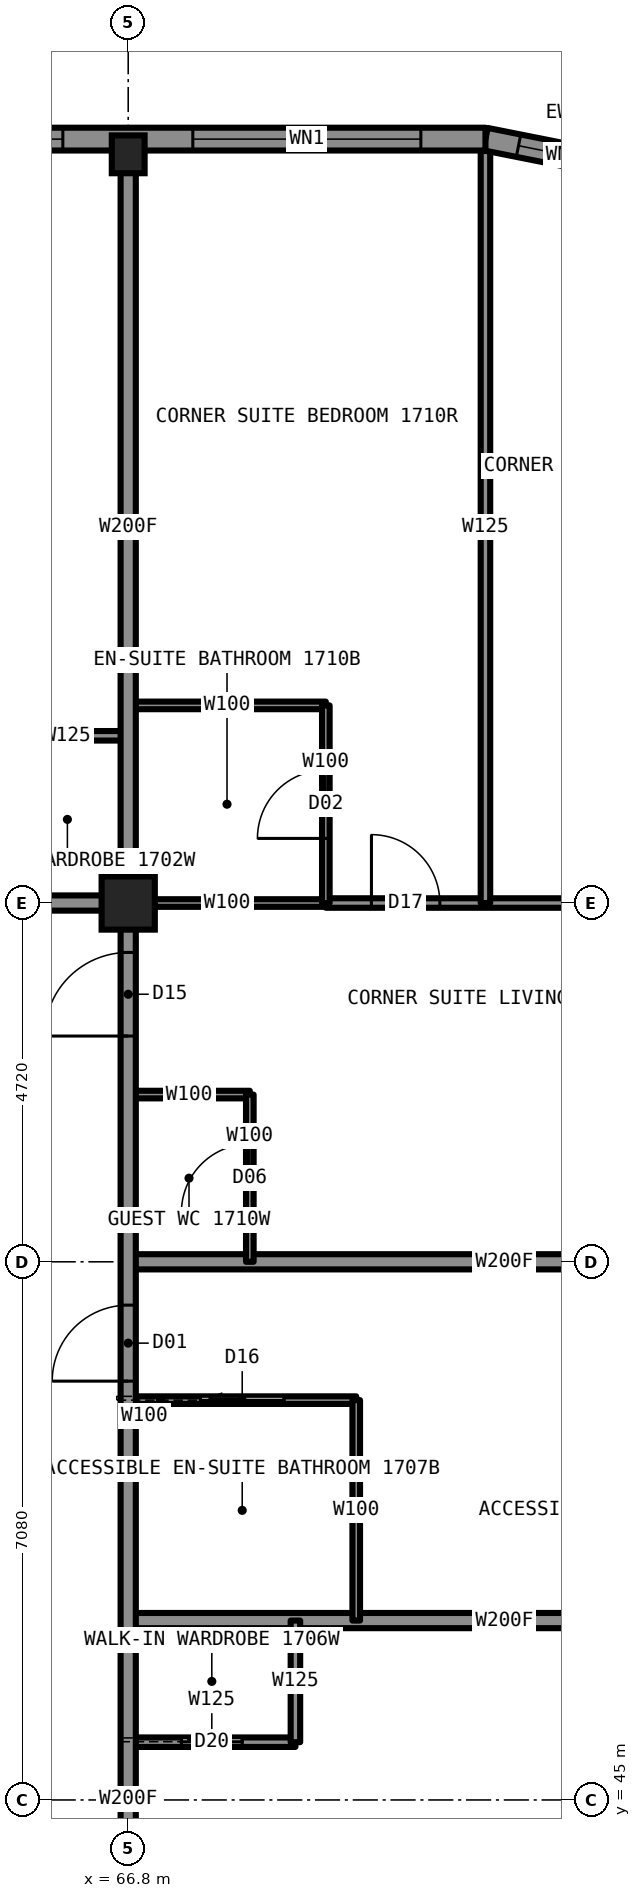
"""IFC4 building model, lengths in metres.
Left out: names, types, materials, properties, quantities, classifications, styles, units other than length and angle.
Written with IfcOpenShell. Run it as: python <this file> out.ifc"""

import sys

from ifc_helpers import new_model, si_unit, direction, frame, frame_2d, origin, origin_2d, place, context, subcontext, project, spatial, rectangle, hollow_rectangle, i_section, extrude, element, fill, save


model = new_model("IFC4")
c1 = context("Model", 3, precision=1e-05, world=origin(), true_north=direction((0.0, 1.0)))
c2 = subcontext(c1, "Body", "Model", "MODEL_VIEW")
j1 = project(units=[si_unit("LENGTHUNIT", "METRE"), si_unit("PLANEANGLEUNIT", "RADIAN")], contexts=[c1])
p1 = place(None, origin())
s1 = spatial("IfcSite", under=j1, at=p1, CompositionType="ELEMENT")
p2 = place(p1, origin())
s2 = spatial("IfcBuilding", under=s1, at=p2, CompositionType="ELEMENT")
p3 = place(p2, frame((0.0, 0.0, 60.0)))
s3 = spatial("IfcBuildingStorey", under=s2, at=p3, CompositionType="ELEMENT", Elevation=60.0)
p4 = place(p3, frame((66.8, 66.65, 0.0), z_axis=(0.0, 0.0, 1.0), x_axis=(1.0, 0.0, 0.0)))
e1 = element("IfcColumn", 1, at=p4, inside=s3, PredefinedType="COLUMN", context=c2, shape_type="SweptSolid", body=[
    extrude(i_section(OverallWidth=0.432, OverallDepth=0.498, WebThickness=0.056, FlangeThickness=0.089, at=origin_2d()), origin(), (0.0, 0.0, 1.0), 3.5),
])
p5 = place(p3, frame((66.8, 56.8, 0.0), z_axis=(0.0, 0.0, 1.0), x_axis=(1.0, 0.0, 0.0)))
e2 = element("IfcColumn", 2, at=p5, inside=s3, PredefinedType="COLUMN", context=c2, shape_type="SweptSolid", body=[
    extrude(hollow_rectangle(XDim=0.7, YDim=0.7, WallThickness=0.06, at=origin_2d()), origin(), (0.0, 0.0, 1.0), 3.5),
])
p6 = place(p3, frame((66.8, 45.76, 0.0), z_axis=(0.0, 0.0, 1.0), x_axis=(1.0, 0.0, 0.0)))
e3 = element("IfcWall", 3, at=p6, inside=s3, PredefinedType="PARTITIONING", context=c2, shape_type="SweptSolid", body=[
    extrude(rectangle(XDim=2.2, YDim=0.125, at=frame_2d((1.1, 0.0))), origin(), (0.0, 0.0, 1.0), 3.33),
])
p7 = place(p6, frame((0.7, 0.0, 0.0)))
e4 = element("IfcOpeningElement", 4, at=p7, cuts=e3, PredefinedType="OPENING", context=c2, shape_type="SweptSolid", body=[
    extrude(rectangle(XDim=0.8, YDim=2.1, at=frame_2d((0.4, 1.05))), frame((0.0, 0.073, 0.0), z_axis=(0.0, -1.0, 0.0), x_axis=(1.0, 0.0, 0.0)), (0.0, 0.0, 1.0), 0.145),
])
p8 = place(p3, frame((66.8, 56.8, 0.0), z_axis=(0.0, 0.0, 1.0), x_axis=(1.0, 0.0, 0.0)))
e5 = element("IfcWall", 5, at=p8, inside=s3, PredefinedType="PARTITIONING", context=c2, shape_type="SweptSolid", body=[
    extrude(rectangle(XDim=2.6, YDim=0.1, at=frame_2d((1.3, 0.0))), origin(), (0.0, 0.0, 1.0), 2.573),
])
p9 = place(p3, frame((43.2, 56.8, 0.0), z_axis=(0.0, 0.0, 1.0), x_axis=(1.0, 0.0, 0.0)))
e6 = element("IfcWall", 6, at=p9, inside=s3, PredefinedType="PARTITIONING", context=c2, shape_type="SweptSolid", body=[
    extrude(rectangle(XDim=23.6, YDim=0.2, at=frame_2d((11.8, 0.0))), origin(), (0.0, 0.0, 1.0), 3.33),
])
p10 = place(p9, frame((1.85, 0.0, 0.0)))
e7 = element("IfcOpeningElement", 7, at=p10, cuts=e6, PredefinedType="OPENING", context=c2, shape_type="SweptSolid", body=[
    extrude(rectangle(XDim=1.1, YDim=2.2, at=frame_2d((0.55, 1.1))), frame((0.0, 0.11, 0.0), z_axis=(0.0, -1.0, 0.0), x_axis=(1.0, 0.0, 0.0)), (0.0, 0.0, 1.0), 0.22),
])
p11 = place(p9, frame((17.16, 0.0, 0.0)))
e8 = element("IfcOpeningElement", 8, at=p11, cuts=e6, PredefinedType="OPENING", context=c2, shape_type="SweptSolid", body=[
    extrude(rectangle(XDim=1.0, YDim=2.2, at=frame_2d((0.5, 1.1))), frame((0.0, 0.11, 0.0), z_axis=(0.0, -1.0, 0.0), x_axis=(1.0, 0.0, 0.0)), (0.0, 0.0, 1.0), 0.22),
])
p12 = place(p3, frame((69.4, 56.8, 0.0), z_axis=(0.0, 0.0, 1.0), x_axis=(1.0, 0.0, 0.0)))
e9 = element("IfcWall", 9, at=p12, inside=s3, PredefinedType="PARTITIONING", context=c2, shape_type="SweptSolid", body=[
    extrude(rectangle(XDim=7.3, YDim=0.125, at=frame_2d((3.65, 0.0))), origin(), (0.0, 0.0, 1.0), 2.573),
])
p13 = place(p12, frame((0.6, 0.0, 0.0)))
e10 = element("IfcOpeningElement", 10, at=p13, cuts=e9, PredefinedType="OPENING", context=c2, shape_type="SweptSolid", body=[
    extrude(rectangle(XDim=0.9, YDim=2.2, at=frame_2d((0.45, 1.1))), frame((0.0, 0.073, 0.0), z_axis=(0.0, -1.0, 0.0), x_axis=(1.0, 0.0, 0.0)), (0.0, 0.0, 1.0), 0.145),
])
p14 = place(p12, frame((4.4, 0.0, 0.0)))
e11 = element("IfcOpeningElement", 11, at=p14, cuts=e9, PredefinedType="OPENING", context=c2, shape_type="SweptSolid", body=[
    extrude(rectangle(XDim=0.9, YDim=2.2, at=frame_2d((0.45, 1.1))), frame((0.0, 0.073, 0.0), z_axis=(0.0, -1.0, 0.0), x_axis=(1.0, 0.0, 0.0)), (0.0, 0.0, 1.0), 0.145),
])
p15 = place(p3, frame((65.2, 59.0, 0.0), z_axis=(0.0, 0.0, 1.0), x_axis=(1.0, 0.0, 0.0)))
e12 = element("IfcWall", 12, at=p15, inside=s3, PredefinedType="PARTITIONING", context=c2, shape_type="SweptSolid", body=[
    extrude(rectangle(XDim=1.6, YDim=0.125, at=frame_2d((0.8, 0.0))), origin(), (0.0, 0.0, 1.0), 3.33),
])
p16 = place(p3, frame((66.8, 59.4, 0.0), z_axis=(0.0, 0.0, 1.0), x_axis=(1.0, 0.0, 0.0)))
e13 = element("IfcWall", 13, at=p16, inside=s3, PredefinedType="PARTITIONING", context=c2, shape_type="SweptSolid", body=[
    extrude(rectangle(XDim=2.6, YDim=0.1, at=frame_2d((1.3, 0.0))), origin(), (0.0, 0.0, 1.0), 3.33),
])
p17 = place(p3, frame((66.8, 47.36, 0.0), z_axis=(0.0, 0.0, 1.0), x_axis=(1.0, 0.0, 0.0)))
e14 = element("IfcWall", 14, at=p17, inside=s3, PredefinedType="PARTITIONING", context=c2, shape_type="SweptSolid", body=[
    extrude(rectangle(XDim=9.9, YDim=0.2, at=frame_2d((4.95, 0.0))), origin(), (0.0, 0.0, 1.0), 2.723),
])
p18 = place(p3, frame((66.8, 50.26, 0.0), z_axis=(0.0, 0.0, 1.0), x_axis=(1.0, 0.0, 0.0)))
e15 = element("IfcWall", 15, at=p18, inside=s3, PredefinedType="PARTITIONING", context=c2, shape_type="SweptSolid", body=[
    extrude(rectangle(XDim=3.0, YDim=0.1, at=frame_2d((1.5, 0.0))), origin(), (0.0, 0.0, 1.0), 3.33),
])
p19 = place(p18, frame((0.95, 0.0, 0.0)))
e16 = element("IfcOpeningElement", 16, at=p19, cuts=e15, PredefinedType="OPENING", context=c2, shape_type="SweptSolid", body=[
    extrude(rectangle(XDim=1.1, YDim=2.1, at=frame_2d((0.55, 1.05))), frame((0.0, 0.06, 0.0), z_axis=(0.0, -1.0, 0.0), x_axis=(1.0, 0.0, 0.0)), (0.0, 0.0, 1.0), 0.12),
])
p20 = place(p3, frame((66.8, 52.08, 0.0), z_axis=(0.0, 0.0, 1.0), x_axis=(1.0, 0.0, 0.0)))
e17 = element("IfcWall", 17, at=p20, inside=s3, PredefinedType="PARTITIONING", context=c2, shape_type="SweptSolid", body=[
    extrude(rectangle(XDim=9.9, YDim=0.2, at=frame_2d((4.95, 0.0))), origin(), (0.0, 0.0, 1.0), 2.573),
])
p21 = place(p3, frame((66.8, 54.28, 0.0), z_axis=(0.0, 0.0, 1.0), x_axis=(1.0, 0.0, 0.0)))
e18 = element("IfcWall", 18, at=p21, inside=s3, PredefinedType="PARTITIONING", context=c2, shape_type="SweptSolid", body=[
    extrude(rectangle(XDim=1.6, YDim=0.1, at=frame_2d((0.8, 0.0))), origin(), (0.0, 0.0, 1.0), 2.723),
])
p22 = place(p3, frame((66.8, 33.22, 0.0), z_axis=(0.0, 0.0, 1.0), x_axis=(0.0, 1.0, 0.0)))
e19 = element("IfcWall", 19, at=p22, inside=s3, PredefinedType="PARTITIONING", context=c2, shape_type="SweptSolid", body=[
    extrude(rectangle(XDim=23.58, YDim=0.2, at=frame_2d((11.79, 0.0))), origin(), (0.0, 0.0, 1.0), 3.33),
])
p23 = place(p22, frame((7.7, 0.0, 0.0)))
e20 = element("IfcOpeningElement", 20, at=p23, cuts=e19, PredefinedType="OPENING", context=c2, shape_type="SweptSolid", body=[
    extrude(rectangle(XDim=1.0, YDim=2.2, at=frame_2d((0.5, 1.1))), frame((0.0, 0.11, 0.0), z_axis=(0.0, -1.0, 0.0), x_axis=(1.0, 0.0, 0.0)), (0.0, 0.0, 1.0), 0.22),
])
p24 = place(p22, frame((17.29, 0.0, 0.0)))
e21 = element("IfcOpeningElement", 21, at=p24, cuts=e19, PredefinedType="OPENING", context=c2, shape_type="SweptSolid", body=[
    extrude(rectangle(XDim=1.0, YDim=2.2, at=frame_2d((0.5, 1.1))), frame((0.0, 0.11, 0.0), z_axis=(0.0, -1.0, 0.0), x_axis=(1.0, 0.0, 0.0)), (0.0, 0.0, 1.0), 0.22),
])
p25 = place(p22, frame((21.83, 0.0, 0.0)))
e22 = element("IfcOpeningElement", 22, at=p25, cuts=e19, PredefinedType="OPENING", context=c2, shape_type="SweptSolid", body=[
    extrude(rectangle(XDim=1.1, YDim=2.2, at=frame_2d((0.55, 1.1))), frame((0.0, 0.11, 0.0), z_axis=(0.0, -1.0, 0.0), x_axis=(1.0, 0.0, 0.0)), (0.0, 0.0, 1.0), 0.22),
])
p26 = place(p22, frame((0.63, 0.0, 0.0)))
e23 = element("IfcOpeningElement", 23, at=p26, cuts=e19, PredefinedType="OPENING", context=c2, shape_type="SweptSolid", body=[
    extrude(rectangle(XDim=1.1, YDim=2.2, at=frame_2d((0.55, 1.1))), frame((0.0, 0.11, 0.0), z_axis=(0.0, -1.0, 0.0), x_axis=(1.0, 0.0, 0.0)), (0.0, 0.0, 1.0), 0.22),
])
p27 = place(p3, frame((66.8, 56.8, 0.0), z_axis=(0.0, 0.0, 1.0), x_axis=(0.0, 1.0, 0.0)))
e24 = element("IfcWall", 24, at=p27, inside=s3, PredefinedType="PARTITIONING", context=c2, shape_type="SweptSolid", body=[
    extrude(rectangle(XDim=9.9, YDim=0.2, at=frame_2d((4.95, 0.0))), origin(), (0.0, 0.0, 1.0), 2.573),
])
p28 = place(p3, frame((68.4, 52.08, 0.0), z_axis=(0.0, 0.0, 1.0), x_axis=(0.0, 1.0, 0.0)))
e25 = element("IfcWall", 25, at=p28, inside=s3, PredefinedType="PARTITIONING", context=c2, shape_type="SweptSolid", body=[
    extrude(rectangle(XDim=2.2, YDim=0.1, at=frame_2d((1.1, 0.0))), origin(), (0.0, 0.0, 1.0), 3.33),
])
p29 = place(p28, frame((0.65, 0.0, 0.0)))
e26 = element("IfcOpeningElement", 26, at=p29, cuts=e25, PredefinedType="OPENING", context=c2, shape_type="SweptSolid", body=[
    extrude(rectangle(XDim=0.9, YDim=2.1, at=frame_2d((0.45, 1.05))), frame((0.0, 0.06, 0.0), z_axis=(0.0, -1.0, 0.0), x_axis=(1.0, 0.0, 0.0)), (0.0, 0.0, 1.0), 0.12),
])
p30 = place(p3, frame((69.0, 45.76, 0.0), z_axis=(0.0, 0.0, 1.0), x_axis=(0.0, 1.0, 0.0)))
e27 = element("IfcWall", 27, at=p30, inside=s3, PredefinedType="PARTITIONING", context=c2, shape_type="SweptSolid", body=[
    extrude(rectangle(XDim=1.6, YDim=0.125, at=frame_2d((0.8, 0.0))), origin(), (0.0, 0.0, 1.0), 3.33),
])
p31 = place(p3, frame((69.4, 56.8, 0.0), z_axis=(0.0, 0.0, 1.0), x_axis=(0.0, 1.0, 0.0)))
e28 = element("IfcWall", 28, at=p31, inside=s3, PredefinedType="PARTITIONING", context=c2, shape_type="SweptSolid", body=[
    extrude(rectangle(XDim=2.6, YDim=0.1, at=frame_2d((1.3, 0.0))), origin(), (0.0, 0.0, 1.0), 3.33),
])
p32 = place(p31, frame((0.85, 0.0, 0.0)))
e29 = element("IfcOpeningElement", 29, at=p32, cuts=e28, PredefinedType="OPENING", context=c2, shape_type="SweptSolid", body=[
    extrude(rectangle(XDim=0.9, YDim=2.1, at=frame_2d((0.45, 1.05))), frame((0.0, 0.06, 0.0), z_axis=(0.0, -1.0, 0.0), x_axis=(1.0, 0.0, 0.0)), (0.0, 0.0, 1.0), 0.12),
])
p33 = place(p3, frame((69.8, 47.36, 0.0), z_axis=(0.0, 0.0, 1.0), x_axis=(0.0, 1.0, 0.0)))
e30 = element("IfcWall", 30, at=p33, inside=s3, PredefinedType="PARTITIONING", context=c2, shape_type="SweptSolid", body=[
    extrude(rectangle(XDim=2.9, YDim=0.1, at=frame_2d((1.45, 0.0))), origin(), (0.0, 0.0, 1.0), 3.33),
])
p34 = place(p3, frame((71.5, 56.8, 0.0), z_axis=(0.0, 0.0, 1.0), x_axis=(0.0, 1.0, 0.0)))
e31 = element("IfcWall", 31, at=p34, inside=s3, PredefinedType="PARTITIONING", context=c2, shape_type="SweptSolid", body=[
    extrude(rectangle(XDim=9.894, YDim=0.125, at=frame_2d((4.947, 0.0))), origin(), (0.0, 0.0, 1.0), 3.33),
])
p35 = place(p3, frame((73.547, 66.443, 0.0), z_axis=(0.0, 0.0, 1.0), x_axis=(-0.980787050784, 0.195081421501, 0.0)))
e32 = element("IfcWall", 32, at=p35, inside=s3, PredefinedType="SOLIDWALL", context=c2, shape_type="SweptSolid", body=[
    extrude(rectangle(XDim=2.087, YDim=0.3, at=frame_2d((1.044, 0.0))), origin(), (0.0, 0.0, 1.0), 3.33),
])
p36 = place(p35, frame((0.444, 0.0, 0.5)))
e33 = element("IfcOpeningElement", 33, at=p36, cuts=e32, PredefinedType="OPENING", context=c2, shape_type="SweptSolid", body=[
    extrude(rectangle(XDim=1.2, YDim=2.0, at=frame_2d((0.6, 1.0))), frame((0.0, 0.16, 0.0), z_axis=(0.0, -1.0, 0.0), x_axis=(1.0, 0.0, 0.0)), (0.0, 0.0, 1.0), 0.32),
])
p37 = place(p3, frame((71.5, 66.85, 0.0), z_axis=(0.0, 0.0, 1.0), x_axis=(-1.0, 0.0, 0.0)))
e34 = element("IfcWall", 34, at=p37, inside=s3, PredefinedType="SOLIDWALL", context=c2, shape_type="SweptSolid", body=[
    extrude(rectangle(XDim=33.0, YDim=0.3, at=frame_2d((16.5, 0.0))), origin(), (0.0, 0.0, 1.0), 2.83),
])
p38 = place(p37, frame((0.85, 0.0, 0.5)))
e35 = element("IfcOpeningElement", 35, at=p38, cuts=e34, PredefinedType="OPENING", context=c2, shape_type="SweptSolid", body=[
    extrude(rectangle(XDim=3.0, YDim=2.0, at=frame_2d((1.5, 1.0))), frame((0.0, 0.16, 0.0), z_axis=(0.0, -1.0, 0.0), x_axis=(1.0, 0.0, 0.0)), (0.0, 0.0, 1.0), 0.32),
])
p39 = place(p37, frame((5.56, 0.0, 0.5)))
e36 = element("IfcOpeningElement", 36, at=p39, cuts=e34, PredefinedType="OPENING", context=c2, shape_type="SweptSolid", body=[
    extrude(rectangle(XDim=3.0, YDim=2.0, at=frame_2d((1.5, 1.0))), frame((0.0, 0.16, 0.0), z_axis=(0.0, -1.0, 0.0), x_axis=(1.0, 0.0, 0.0)), (0.0, 0.0, 1.0), 0.32),
])
p40 = place(p37, frame((10.28, 0.0, 0.5)))
e37 = element("IfcOpeningElement", 37, at=p40, cuts=e34, PredefinedType="OPENING", context=c2, shape_type="SweptSolid", body=[
    extrude(rectangle(XDim=1.2, YDim=1.7, at=frame_2d((0.6, 0.85))), frame((0.0, 0.16, 0.0), z_axis=(0.0, -1.0, 0.0), x_axis=(1.0, 0.0, 0.0)), (0.0, 0.0, 1.0), 0.32),
])
p41 = place(p37, frame((15.0, 0.0, 0.5)))
e38 = element("IfcOpeningElement", 38, at=p41, cuts=e34, PredefinedType="OPENING", context=c2, shape_type="SweptSolid", body=[
    extrude(rectangle(XDim=3.0, YDim=2.0, at=frame_2d((1.5, 1.0))), frame((0.0, 0.16, 0.0), z_axis=(0.0, -1.0, 0.0), x_axis=(1.0, 0.0, 0.0)), (0.0, 0.0, 1.0), 0.32),
])
p42 = place(p37, frame((21.52, 0.0, 0.5)))
e39 = element("IfcOpeningElement", 39, at=p42, cuts=e34, PredefinedType="OPENING", context=c2, shape_type="SweptSolid", body=[
    extrude(rectangle(XDim=1.2, YDim=1.7, at=frame_2d((0.6, 0.85))), frame((0.0, 0.16, 0.0), z_axis=(0.0, -1.0, 0.0), x_axis=(1.0, 0.0, 0.0)), (0.0, 0.0, 1.0), 0.32),
])
p43 = place(p37, frame((24.44, 0.0, 0.5)))
e40 = element("IfcOpeningElement", 40, at=p43, cuts=e34, PredefinedType="OPENING", context=c2, shape_type="SweptSolid", body=[
    extrude(rectangle(XDim=3.0, YDim=2.0, at=frame_2d((1.5, 1.0))), frame((0.0, 0.16, 0.0), z_axis=(0.0, -1.0, 0.0), x_axis=(1.0, 0.0, 0.0)), (0.0, 0.0, 1.0), 0.32),
])
p44 = place(p37, frame((29.15, 0.0, 0.5)))
e41 = element("IfcOpeningElement", 41, at=p44, cuts=e34, PredefinedType="OPENING", context=c2, shape_type="SweptSolid", body=[
    extrude(rectangle(XDim=3.0, YDim=2.0, at=frame_2d((1.5, 1.0))), frame((0.0, 0.16, 0.0), z_axis=(0.0, -1.0, 0.0), x_axis=(1.0, 0.0, 0.0)), (0.0, 0.0, 1.0), 0.32),
])
p45 = place(p37, frame((11.48, 0.0, 0.5)))
e42 = element("IfcOpeningElement", 42, at=p45, cuts=e34, PredefinedType="OPENING", context=c2, shape_type="SweptSolid", body=[
    extrude(rectangle(XDim=0.6, YDim=0.8, at=frame_2d((0.3, 0.4))), frame((0.0, 0.16, 0.0), z_axis=(0.0, -1.0, 0.0), x_axis=(1.0, 0.0, 0.0)), (0.0, 0.0, 1.0), 0.32),
])
p46 = place(p37, frame((20.87, 0.0, 0.5)))
e43 = element("IfcOpeningElement", 43, at=p46, cuts=e34, PredefinedType="OPENING", context=c2, shape_type="SweptSolid", body=[
    extrude(rectangle(XDim=0.6, YDim=0.8, at=frame_2d((0.3, 0.4))), frame((0.0, 0.16, 0.0), z_axis=(0.0, -1.0, 0.0), x_axis=(1.0, 0.0, 0.0)), (0.0, 0.0, 1.0), 0.32),
])
p47 = place(p7, origin())
e44 = element("IfcDoor", 44, at=p47, inside=s3, OperationType="SLIDING_TO_LEFT", PredefinedType="DOOR", context=c2, shape_type="SweptSolid", body=[
    extrude(rectangle(XDim=0.8, YDim=2.1, at=frame_2d((0.4, 1.05))), frame((0.0, 0.025, 0.0), z_axis=(0.0, -1.0, 0.0), x_axis=(1.0, 0.0, 0.0)), (0.0, 0.0, 1.0), 0.05),
])
fill(e4, e44)
p48 = place(p24, origin())
e45 = element("IfcDoor", 45, at=p48, inside=s3, OperationType="SINGLE_SWING_LEFT", PredefinedType="DOOR", context=c2, shape_type="SweptSolid", body=[
    extrude(rectangle(XDim=1.0, YDim=2.2, at=frame_2d((0.5, 1.1))), frame((0.0, 0.025, 0.0), z_axis=(0.0, -1.0, 0.0), x_axis=(1.0, 0.0, 0.0)), (0.0, 0.0, 1.0), 0.05),
])
fill(e21, e45)
p49 = place(p19, origin())
e46 = element("IfcDoor", 46, at=p49, inside=s3, OperationType="SLIDING_TO_LEFT", PredefinedType="DOOR", context=c2, shape_type="SweptSolid", body=[
    extrude(rectangle(XDim=1.1, YDim=2.1, at=frame_2d((0.55, 1.05))), frame((0.0, 0.025, 0.0), z_axis=(0.0, -1.0, 0.0), x_axis=(1.0, 0.0, 0.0)), (0.0, 0.0, 1.0), 0.05),
])
fill(e16, e46)
p50 = place(p25, origin())
e47 = element("IfcDoor", 47, at=p50, inside=s3, OperationType="SINGLE_SWING_LEFT", PredefinedType="DOOR", context=c2, shape_type="SweptSolid", body=[
    extrude(rectangle(XDim=1.1, YDim=2.2, at=frame_2d((0.55, 1.1))), frame((0.0, 0.025, 0.0), z_axis=(0.0, -1.0, 0.0), x_axis=(1.0, 0.0, 0.0)), (0.0, 0.0, 1.0), 0.05),
])
fill(e22, e47)
p51 = place(p32, origin())
e48 = element("IfcDoor", 48, at=p51, inside=s3, OperationType="SINGLE_SWING_RIGHT", PredefinedType="DOOR", context=c2, shape_type="SweptSolid", body=[
    extrude(rectangle(XDim=0.9, YDim=2.1, at=frame_2d((0.45, 1.05))), frame((0.0, 0.025, 0.0), z_axis=(0.0, -1.0, 0.0), x_axis=(1.0, 0.0, 0.0)), (0.0, 0.0, 1.0), 0.05),
])
fill(e29, e48)
p52 = place(p13, origin())
e49 = element("IfcDoor", 49, at=p52, inside=s3, OperationType="SINGLE_SWING_LEFT", PredefinedType="DOOR", context=c2, shape_type="SweptSolid", body=[
    extrude(rectangle(XDim=0.9, YDim=2.2, at=frame_2d((0.45, 1.1))), frame((0.0, 0.025, 0.0), z_axis=(0.0, -1.0, 0.0), x_axis=(1.0, 0.0, 0.0)), (0.0, 0.0, 1.0), 0.05),
])
fill(e10, e49)
p53 = place(p29, origin())
e50 = element("IfcDoor", 50, at=p53, inside=s3, OperationType="SINGLE_SWING_LEFT", PredefinedType="DOOR", context=c2, shape_type="SweptSolid", body=[
    extrude(rectangle(XDim=0.9, YDim=2.1, at=frame_2d((0.45, 1.05))), frame((0.0, 0.025, 0.0), z_axis=(0.0, -1.0, 0.0), x_axis=(1.0, 0.0, 0.0)), (0.0, 0.0, 1.0), 0.05),
])
fill(e26, e50)
p54 = place(p36, origin())
e51 = element("IfcWindow", 51, at=p54, inside=s3, PartitioningType="SINGLE_PANEL", PredefinedType="WINDOW", context=c2, shape_type="SweptSolid", body=[
    extrude(rectangle(XDim=1.2, YDim=2.0, at=frame_2d((0.6, 1.0))), frame((0.0, 0.03, 0.0), z_axis=(0.0, -1.0, 0.0), x_axis=(1.0, 0.0, 0.0)), (0.0, 0.0, 1.0), 0.06),
])
fill(e33, e51)
p55 = place(p38, origin())
e52 = element("IfcWindow", 52, at=p55, inside=s3, PartitioningType="SINGLE_PANEL", PredefinedType="WINDOW", context=c2, shape_type="SweptSolid", body=[
    extrude(rectangle(XDim=3.0, YDim=2.0, at=frame_2d((1.5, 1.0))), frame((0.0, 0.03, 0.0), z_axis=(0.0, -1.0, 0.0), x_axis=(1.0, 0.0, 0.0)), (0.0, 0.0, 1.0), 0.06),
])
fill(e35, e52)
p56 = place(p39, origin())
e53 = element("IfcWindow", 53, at=p56, inside=s3, PartitioningType="SINGLE_PANEL", PredefinedType="WINDOW", context=c2, shape_type="SweptSolid", body=[
    extrude(rectangle(XDim=3.0, YDim=2.0, at=frame_2d((1.5, 1.0))), frame((0.0, 0.03, 0.0), z_axis=(0.0, -1.0, 0.0), x_axis=(1.0, 0.0, 0.0)), (0.0, 0.0, 1.0), 0.06),
])
fill(e36, e53)
save(model, sys.argv[1])
